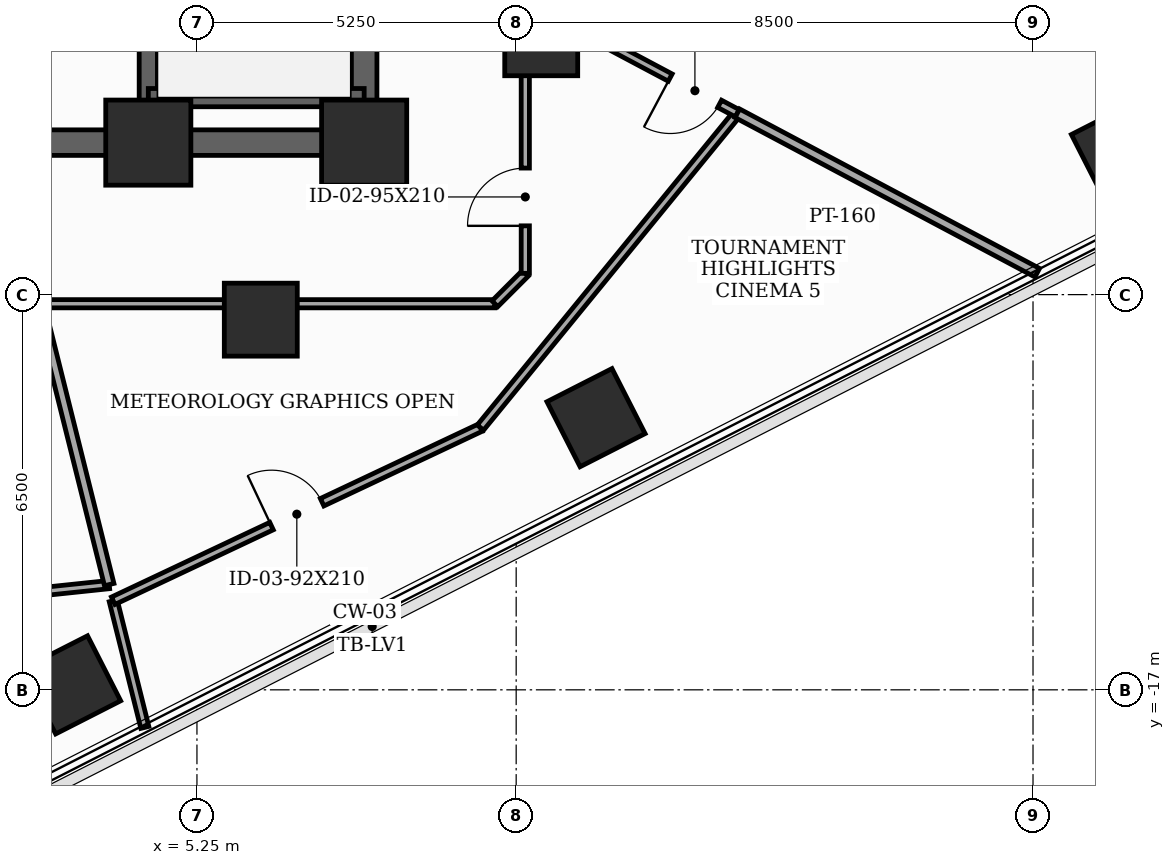
"""IFC4 building model, lengths in metres.
Left out: names, types, materials, properties, quantities, classifications, styles, units other than length and angle.
Written with IfcOpenShell. Run it as: python <this file> out.ifc"""

import sys

from ifc_helpers import new_model, si_unit, direction, frame, frame_2d, origin, origin_2d, place, context, subcontext, project, spatial, rectangle, extrude, element, fill, save


model = new_model("IFC4")
c1 = context("Model", 3, precision=1e-05, world=origin(), true_north=direction((0.0, 1.0)))
c2 = subcontext(c1, "Body", "Model", "MODEL_VIEW")
j1 = project(units=[si_unit("LENGTHUNIT", "METRE"), si_unit("PLANEANGLEUNIT", "RADIAN")], contexts=[c1])
p1 = place(None, origin())
s1 = spatial("IfcSite", under=j1, at=p1, CompositionType="ELEMENT")
p2 = place(p1, origin())
s2 = spatial("IfcBuilding", under=s1, at=p2, CompositionType="ELEMENT")
p3 = place(p2, frame((0.0, 0.0, 123.6)))
s3 = spatial("IfcBuildingStorey", under=s2, at=p3, CompositionType="ELEMENT", Elevation=123.6)
for number, where, z_axis, x_axis in (
    (1, (4.45, -8.0, 0.0), (0.0, 0.0, 1.0), (1.0, 0.0, 0.0)),
    (2, (8.0, -8.0, 0.0), (0.0, 0.0, 1.0), (1.0, 0.0, 0.0)),
):
    element("IfcColumn", number, at=place(p3, frame(where, z_axis=z_axis, x_axis=x_axis)), inside=s3, PredefinedType="COLUMN", context=c2, shape_type="SweptSolid", body=[
        extrude(rectangle(XDim=1.4, YDim=1.4, at=origin_2d()), origin(), (0.0, 0.0, 1.0), 3.7),
    ])
for number, where, z_axis, x_axis in (
    (3, (6.3, -10.912, 0.0), (0.0, 0.0, 1.0), (1.0, 0.0, 0.0)),
    (4, (10.912, -6.3, 0.0), (0.0, 0.0, 1.0), (1.0, 0.0, 0.0)),
    (5, (3.188, -16.918, 0.0), (0.0, 0.0, 1.0), (0.891, 0.454, 0.0)),
    (6, (11.813, -12.524, 0.0), (0.0, 0.0, 1.0), (0.891, 0.454, 0.0)),
    (7, (20.438, -8.129, 0.0), (0.0, 0.0, 1.0), (0.891, 0.454, 0.0)),
):
    element("IfcColumn", number, at=place(p3, frame(where, z_axis=z_axis, x_axis=x_axis)), inside=s3, PredefinedType="COLUMN", context=c2, shape_type="SweptSolid", body=[
        extrude(rectangle(XDim=1.2, YDim=1.2, at=origin_2d()), origin(), (0.0, 0.0, 1.0), 3.7),
    ])
p4 = place(p3, frame((8.0, -8.0, 0.0), z_axis=(0.0, 0.0, 1.0), x_axis=(0.0, 1.0, 0.0)))
e8 = element("IfcWall", 8, at=p4, inside=s3, PredefinedType="SHEAR", context=c2, shape_type="SweptSolid", body=[
    extrude(rectangle(XDim=16.0, YDim=0.42, at=frame_2d((8.0, 0.0))), origin(), (0.0, 0.0, 1.0), 3.5),
])
p5 = place(p4, frame((9.6, 0.0, 0.0)))
e9 = element("IfcOpeningElement", 9, at=p5, cuts=e8, PredefinedType="OPENING", context=c2, shape_type="SweptSolid", body=[
    extrude(rectangle(XDim=1.05, YDim=2.15, at=frame_2d((0.525, 1.075))), frame((0.0, 0.22, 0.0), z_axis=(0.0, -1.0, 0.0), x_axis=(1.0, 0.0, 0.0)), (0.0, 0.0, 1.0), 0.44),
])
p6 = place(p4, frame((14.229, 0.0, 0.0)))
e10 = element("IfcOpeningElement", 10, at=p6, cuts=e8, PredefinedType="OPENING", context=c2, shape_type="SweptSolid", body=[
    extrude(rectangle(XDim=0.85, YDim=2.02, at=frame_2d((0.425, 1.01))), frame((0.0, 0.22, 0.0), z_axis=(0.0, -1.0, 0.0), x_axis=(1.0, 0.0, 0.0)), (0.0, 0.0, 1.0), 0.44),
])
p7 = place(p3, frame((-8.0, -8.0, 0.0), z_axis=(0.0, 0.0, 1.0), x_axis=(1.0, 0.0, 0.0)))
e11 = element("IfcWall", 11, at=p7, inside=s3, PredefinedType="SHEAR", context=c2, shape_type="SweptSolid", body=[
    extrude(rectangle(XDim=16.0, YDim=0.42, at=frame_2d((8.0, 0.0))), origin(), (0.0, 0.0, 1.0), 3.5),
])
p8 = place(p7, frame((7.52, 0.0, 0.0)))
e12 = element("IfcOpeningElement", 12, at=p8, cuts=e11, PredefinedType="OPENING", context=c2, shape_type="SweptSolid", body=[
    extrude(rectangle(XDim=0.95, YDim=2.1, at=frame_2d((0.475, 1.05))), frame((0.0, 0.22, 0.0), z_axis=(0.0, -1.0, 0.0), x_axis=(1.0, 0.0, 0.0)), (0.0, 0.0, 1.0), 0.44),
])
p9 = place(p3, frame((4.45, -7.79, 0.0), z_axis=(0.0, 0.0, 1.0), x_axis=(0.0, 1.0, 0.0)))
e13 = element("IfcWall", 13, at=p9, inside=s3, PredefinedType="SHEAR", context=c2, shape_type="SweptSolid", body=[
    extrude(rectangle(XDim=15.58, YDim=0.3, at=frame_2d((7.79, 0.0))), origin(), (0.0, 0.0, 1.0), 3.5),
])
p10 = place(p3, frame((4.45, -7.26, 0.0), z_axis=(0.0, 0.0, 1.0), x_axis=(1.0, 0.0, 0.0)))
e14 = element("IfcWall", 14, at=p10, inside=s3, PredefinedType="SHEAR", context=c2, shape_type="SweptSolid", body=[
    extrude(rectangle(XDim=3.55, YDim=0.3, at=frame_2d((1.775, 0.0))), origin(), (0.0, 0.0, 1.0), 3.5),
])
p11 = place(p3, frame((2.655, -10.65, 0.0), z_axis=(0.0, 0.0, 1.0), x_axis=(1.0, 0.0, 0.0)))
e15 = element("IfcWall", 15, at=p11, inside=s3, PredefinedType="PARTITIONING", context=c2, shape_type="SweptSolid", body=[
    extrude(rectangle(XDim=7.495, YDim=0.135, at=frame_2d((3.748, 0.0))), origin(), (0.0, 0.0, 1.0), 2.785),
])
p12 = place(p3, frame((10.15, -10.65, 0.0), z_axis=(0.0, 0.0, 1.0), x_axis=(0.707106781187, 0.707106781187, 0.0)))
e16 = element("IfcWall", 16, at=p12, inside=s3, PredefinedType="PARTITIONING", context=c2, shape_type="SweptSolid", body=[
    extrude(rectangle(XDim=0.707, YDim=0.135, at=frame_2d((0.354, 0.0))), origin(), (0.0, 0.0, 1.0), 3.5),
])
p13 = place(p3, frame((10.65, -10.15, 0.0), z_axis=(0.0, 0.0, 1.0), x_axis=(0.0, 1.0, 0.0)))
e17 = element("IfcWall", 17, at=p13, inside=s3, PredefinedType="PARTITIONING", context=c2, shape_type="SweptSolid", body=[
    extrude(rectangle(XDim=4.487, YDim=0.135, at=frame_2d((2.243, 0.0))), origin(), (0.0, 0.0, 1.0), 2.785),
])
p14 = place(p13, frame((0.781, 0.0, 0.0)))
e18 = element("IfcOpeningElement", 18, at=p14, cuts=e17, PredefinedType="OPENING", context=c2, shape_type="SweptSolid", body=[
    extrude(rectangle(XDim=0.95, YDim=2.1, at=frame_2d((0.475, 1.05))), frame((0.0, 0.077, 0.0), z_axis=(0.0, -1.0, 0.0), x_axis=(1.0, 0.0, 0.0)), (0.0, 0.0, 1.0), 0.155),
])
p15 = place(p3, frame((3.807, -15.269, 0.0), z_axis=(0.0, 0.0, 1.0), x_axis=(-0.994513256503, -0.104610623932, 0.0)))
e19 = element("IfcWall", 19, at=p15, inside=s3, PredefinedType="PARTITIONING", context=c2, shape_type="SweptSolid", body=[
    extrude(rectangle(XDim=4.798, YDim=0.135, at=frame_2d((2.399, 0.0))), origin(), (0.0, 0.0, 1.0), 2.885),
])
p16 = place(p3, frame((4.393, -17.618, 0.0), z_axis=(0.0, 0.0, 1.0), x_axis=(-0.242107483306, 0.970249435211, 0.0)))
e20 = element("IfcWall", 20, at=p16, inside=s3, PredefinedType="PARTITIONING", context=c2, shape_type="SweptSolid", body=[
    extrude(rectangle(XDim=2.147, YDim=0.135, at=frame_2d((1.073, 0.0))), origin(), (0.0, 0.0, 1.0), 2.985),
])
p17 = place(p3, frame((3.807, -15.269, 0.0), z_axis=(0.0, 0.0, 1.0), x_axis=(-0.241956377954, 0.970287128209, 0.0)))
e21 = element("IfcWall", 21, at=p17, inside=s3, PredefinedType="PARTITIONING", context=c2, shape_type="SweptSolid", body=[
    extrude(rectangle(XDim=4.76, YDim=0.16, at=frame_2d((2.38, 0.0))), origin(), (0.0, 0.0, 1.0), 2.785),
])
p18 = place(p3, frame((3.873, -15.535, 0.0), z_axis=(0.0, 0.0, 1.0), x_axis=(0.904472849066, 0.426531200855, 0.0)))
e22 = element("IfcWall", 22, at=p18, inside=s3, PredefinedType="PARTITIONING", context=c2, shape_type="SweptSolid", body=[
    extrude(rectangle(XDim=6.677, YDim=0.135, at=frame_2d((3.338, 0.0))), origin(), (0.0, 0.0, 1.0), 3.5),
])
p19 = place(p18, frame((2.878, 0.0, 0.0)))
e23 = element("IfcOpeningElement", 23, at=p19, cuts=e22, PredefinedType="OPENING", context=c2, shape_type="SweptSolid", body=[
    extrude(rectangle(XDim=0.92, YDim=2.1, at=frame_2d((0.46, 1.05))), frame((0.0, 0.077, 0.0), z_axis=(0.0, -1.0, 0.0), x_axis=(1.0, 0.0, 0.0)), (0.0, 0.0, 1.0), 0.155),
])
p20 = place(p3, frame((9.912, -12.687, 0.0), z_axis=(0.0, 0.0, 1.0), x_axis=(0.632781686385, 0.774330250846, 0.0)))
e24 = element("IfcWall", 24, at=p20, inside=s3, PredefinedType="PARTITIONING", context=c2, shape_type="SweptSolid", body=[
    extrude(rectangle(XDim=6.677, YDim=0.135, at=frame_2d((3.338, 0.0))), origin(), (0.0, 0.0, 1.0), 2.885),
])
p21 = place(p3, frame((14.137, -7.517, 0.0), z_axis=(0.0, 0.0, 1.0), x_axis=(-0.882957991608, 0.46945200506, 0.0)))
e25 = element("IfcWall", 25, at=p21, inside=s3, PredefinedType="PARTITIONING", context=c2, shape_type="SweptSolid", body=[
    extrude(rectangle(XDim=3.949, YDim=0.135, at=frame_2d((1.975, 0.0))), origin(), (0.0, 0.0, 1.0), 2.785),
])
p22 = place(p21, frame((0.33, 0.0, 0.0)))
e26 = element("IfcOpeningElement", 26, at=p22, cuts=e25, PredefinedType="OPENING", context=c2, shape_type="SweptSolid", body=[
    extrude(rectangle(XDim=0.92, YDim=2.1, at=frame_2d((0.46, 1.05))), frame((0.0, 0.077, 0.0), z_axis=(0.0, -1.0, 0.0), x_axis=(1.0, 0.0, 0.0)), (0.0, 0.0, 1.0), 0.155),
])
p23 = place(p3, frame((19.07, -10.14, 0.0), z_axis=(0.0, 0.0, 1.0), x_axis=(-0.882959500857, 0.469449166413, 0.0)))
e27 = element("IfcWall", 27, at=p23, inside=s3, PredefinedType="PARTITIONING", context=c2, shape_type="SweptSolid", body=[
    extrude(rectangle(XDim=5.586, YDim=0.16, at=frame_2d((2.793, 0.0))), origin(), (0.0, 0.0, 1.0), 2.985),
])
p24 = place(p14, origin())
e28 = element("IfcDoor", 28, at=p24, inside=s3, OperationType="SINGLE_SWING_LEFT", PredefinedType="DOOR", context=c2, shape_type="SweptSolid", body=[
    extrude(rectangle(XDim=0.95, YDim=2.1, at=frame_2d((0.475, 1.05))), frame((0.0, 0.025, 0.0), z_axis=(0.0, -1.0, 0.0), x_axis=(1.0, 0.0, 0.0)), (0.0, 0.0, 1.0), 0.05),
])
fill(e18, e28)
p25 = place(p19, origin())
e29 = element("IfcDoor", 29, at=p25, inside=s3, OperationType="SINGLE_SWING_LEFT", PredefinedType="DOOR", context=c2, shape_type="SweptSolid", body=[
    extrude(rectangle(XDim=0.92, YDim=2.1, at=frame_2d((0.46, 1.05))), frame((0.0, 0.025, 0.0), z_axis=(0.0, -1.0, 0.0), x_axis=(1.0, 0.0, 0.0)), (0.0, 0.0, 1.0), 0.05),
])
fill(e23, e29)
p26 = place(p22, origin())
e30 = element("IfcDoor", 30, at=p26, inside=s3, OperationType="SINGLE_SWING_RIGHT", PredefinedType="DOOR", context=c2, shape_type="SweptSolid", body=[
    extrude(rectangle(XDim=0.92, YDim=2.1, at=frame_2d((0.46, 1.05))), frame((0.0, 0.025, 0.0), z_axis=(0.0, -1.0, 0.0), x_axis=(1.0, 0.0, 0.0)), (0.0, 0.0, 1.0), 0.05),
])
fill(e26, e30)
save(model, sys.argv[1])
